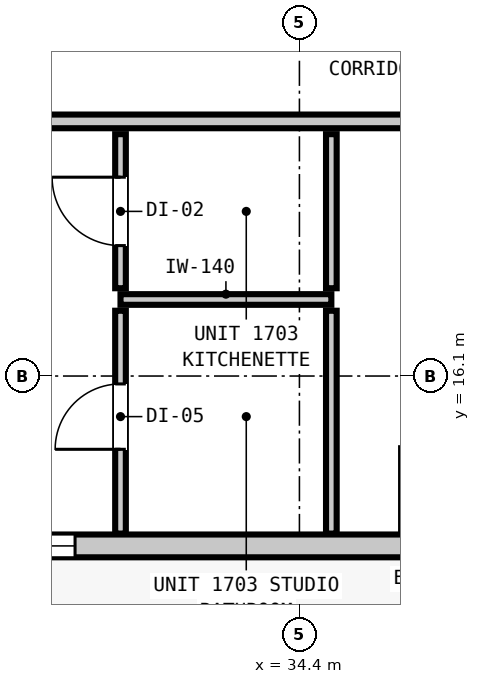
"""IFC4 building model, lengths in metres.
Left out: names, types, materials, properties, quantities, classifications, styles, units other than length and angle.
Written with IfcOpenShell. Run it as: python <this file> out.ifc"""

import sys

from ifc_helpers import new_model, si_unit, direction, frame, frame_2d, origin, place, context, subcontext, project, spatial, rectangle, extrude, element, fill, save


model = new_model("IFC4")
c1 = context("Model", 3, precision=1e-05, world=origin(), true_north=direction((0.0, 1.0)))
c2 = subcontext(c1, "Body", "Model", "MODEL_VIEW")
j1 = project(units=[si_unit("LENGTHUNIT", "METRE"), si_unit("PLANEANGLEUNIT", "RADIAN")], contexts=[c1])
p1 = place(None, origin())
s1 = spatial("IfcSite", under=j1, at=p1, CompositionType="ELEMENT")
p2 = place(p1, origin())
s2 = spatial("IfcBuilding", under=s1, at=p2, CompositionType="ELEMENT")
p3 = place(p2, frame((0.0, 0.0, 61.84)))
s3 = spatial("IfcBuildingStorey", under=s2, at=p3, CompositionType="ELEMENT", Elevation=61.84)
p4 = place(p3, frame((47.835, 13.865, 0.0), z_axis=(0.0, 0.0, 1.0), x_axis=(-1.0, 0.0, 0.0)))
e1 = element("IfcWall", 1, at=p4, inside=s3, PredefinedType="STANDARD", context=c2, shape_type="SweptSolid", body=[
    extrude(rectangle(XDim=37.47, YDim=0.3, at=frame_2d((18.735, 0.0))), origin(), (0.0, 0.0, 1.0), 3.06),
])
p5 = place(p4, frame((1.201, 0.0, 0.0)))
e2 = element("IfcOpeningElement", 2, at=p5, cuts=e1, PredefinedType="OPENING", context=c2, shape_type="SweptSolid", body=[
    extrude(rectangle(XDim=1.1, YDim=2.15, at=frame_2d((0.55, 1.075))), frame((0.0, 0.16, 0.0), z_axis=(0.0, -1.0, 0.0), x_axis=(1.0, 0.0, 0.0)), (0.0, 0.0, 1.0), 0.32),
])
p6 = place(p4, frame((30.75, 0.0, 0.85)))
e3 = element("IfcOpeningElement", 3, at=p6, cuts=e1, PredefinedType="OPENING", context=c2, shape_type="SweptSolid", body=[
    extrude(rectangle(XDim=1.05, YDim=1.65, at=frame_2d((0.525, 0.825))), frame((0.0, 0.16, 0.0), z_axis=(0.0, -1.0, 0.0), x_axis=(1.0, 0.0, 0.0)), (0.0, 0.0, 1.0), 0.32),
])
p7 = place(p4, frame((24.35, 0.0, 0.85)))
e4 = element("IfcOpeningElement", 4, at=p7, cuts=e1, PredefinedType="OPENING", context=c2, shape_type="SweptSolid", body=[
    extrude(rectangle(XDim=1.05, YDim=1.65, at=frame_2d((0.525, 0.825))), frame((0.0, 0.16, 0.0), z_axis=(0.0, -1.0, 0.0), x_axis=(1.0, 0.0, 0.0)), (0.0, 0.0, 1.0), 0.32),
])
p8 = place(p4, frame((16.387, 0.0, 0.85)))
e5 = element("IfcOpeningElement", 5, at=p8, cuts=e1, PredefinedType="OPENING", context=c2, shape_type="SweptSolid", body=[
    extrude(rectangle(XDim=1.05, YDim=1.65, at=frame_2d((0.525, 0.825))), frame((0.0, 0.16, 0.0), z_axis=(0.0, -1.0, 0.0), x_axis=(1.0, 0.0, 0.0)), (0.0, 0.0, 1.0), 0.32),
])
p9 = place(p4, frame((6.043, 0.0, 0.85)))
e6 = element("IfcOpeningElement", 6, at=p9, cuts=e1, PredefinedType="OPENING", context=c2, shape_type="SweptSolid", body=[
    extrude(rectangle(XDim=1.05, YDim=1.65, at=frame_2d((0.525, 0.825))), frame((0.0, 0.16, 0.0), z_axis=(0.0, -1.0, 0.0), x_axis=(1.0, 0.0, 0.0)), (0.0, 0.0, 1.0), 0.32),
])
p10 = place(p3, frame((8.027, 19.45, 0.0), z_axis=(0.0, 0.0, 1.0), x_axis=(1.0, 0.0, 0.0)))
e7 = element("IfcWall", 7, at=p10, inside=s3, PredefinedType="PARTITIONING", context=c2, shape_type="SweptSolid", body=[
    extrude(rectangle(XDim=28.902, YDim=0.18, at=frame_2d((14.451, 0.0))), origin(), (0.0, 0.0, 1.0), 3.06),
])
p11 = place(p10, frame((6.533, 0.0, 0.0)))
e8 = element("IfcOpeningElement", 8, at=p11, cuts=e7, PredefinedType="OPENING", context=c2, shape_type="SweptSolid", body=[
    extrude(rectangle(XDim=1.0, YDim=2.15, at=frame_2d((0.5, 1.075))), frame((0.0, 0.1, 0.0), z_axis=(0.0, -1.0, 0.0), x_axis=(1.0, 0.0, 0.0)), (0.0, 0.0, 1.0), 0.2),
])
p12 = place(p10, frame((13.293, 0.0, 0.0)))
e9 = element("IfcOpeningElement", 9, at=p12, cuts=e7, PredefinedType="OPENING", context=c2, shape_type="SweptSolid", body=[
    extrude(rectangle(XDim=1.0, YDim=2.15, at=frame_2d((0.5, 1.075))), frame((0.0, 0.1, 0.0), z_axis=(0.0, -1.0, 0.0), x_axis=(1.0, 0.0, 0.0)), (0.0, 0.0, 1.0), 0.2),
])
p13 = place(p10, frame((21.256, 0.0, 0.0)))
e10 = element("IfcOpeningElement", 10, at=p13, cuts=e7, PredefinedType="OPENING", context=c2, shape_type="SweptSolid", body=[
    extrude(rectangle(XDim=1.0, YDim=2.15, at=frame_2d((0.5, 1.075))), frame((0.0, 0.1, 0.0), z_axis=(0.0, -1.0, 0.0), x_axis=(1.0, 0.0, 0.0)), (0.0, 0.0, 1.0), 0.2),
])
p14 = place(p3, frame((32.046, 17.107, 0.0), z_axis=(0.0, 0.0, 1.0), x_axis=(1.0, 0.0, 0.0)))
e11 = element("IfcWall", 11, at=p14, inside=s3, PredefinedType="PARTITIONING", context=c2, shape_type="SweptSolid", body=[
    extrude(rectangle(XDim=2.774, YDim=0.14, at=frame_2d((1.387, 0.0))), origin(), (0.0, 0.0, 1.0), 3.06),
])
p15 = place(p3, frame((32.046, 14.027, 0.0), z_axis=(0.0, 0.0, 1.0), x_axis=(0.0, 1.0, 0.0)))
e12 = element("IfcWall", 12, at=p15, inside=s3, PredefinedType="PARTITIONING", context=c2, shape_type="SweptSolid", body=[
    extrude(rectangle(XDim=2.932, YDim=0.14, at=frame_2d((1.466, 0.0))), origin(), (0.0, 0.0, 1.0), 3.06),
])
p16 = place(p15, frame((1.109, 0.0, 0.0)))
e13 = element("IfcOpeningElement", 13, at=p16, cuts=e12, PredefinedType="OPENING", context=c2, shape_type="SweptSolid", body=[
    extrude(rectangle(XDim=0.86, YDim=2.02, at=frame_2d((0.43, 1.01))), frame((0.0, 0.08, 0.0), z_axis=(0.0, -1.0, 0.0), x_axis=(1.0, 0.0, 0.0)), (0.0, 0.0, 1.0), 0.16),
])
p17 = place(p3, frame((32.046, 17.255, 0.0), z_axis=(0.0, 0.0, 1.0), x_axis=(0.0, 1.0, 0.0)))
e14 = element("IfcWall", 14, at=p17, inside=s3, PredefinedType="PARTITIONING", context=c2, shape_type="SweptSolid", body=[
    extrude(rectangle(XDim=2.027, YDim=0.14, at=frame_2d((1.014, 0.0))), origin(), (0.0, 0.0, 1.0), 3.06),
])
p18 = place(p17, frame((0.561, 0.0, 0.0)))
e15 = element("IfcOpeningElement", 15, at=p18, cuts=e14, PredefinedType="OPENING", context=c2, shape_type="SweptSolid", body=[
    extrude(rectangle(XDim=0.9, YDim=2.1, at=frame_2d((0.45, 1.05))), frame((0.0, 0.08, 0.0), z_axis=(0.0, -1.0, 0.0), x_axis=(1.0, 0.0, 0.0)), (0.0, 0.0, 1.0), 0.16),
])
p19 = place(p3, frame((34.82, 14.027, 0.0), z_axis=(0.0, 0.0, 1.0), x_axis=(0.0, 1.0, 0.0)))
e16 = element("IfcWall", 16, at=p19, inside=s3, PredefinedType="PARTITIONING", context=c2, shape_type="SweptSolid", body=[
    extrude(rectangle(XDim=2.932, YDim=0.14, at=frame_2d((1.466, 0.0))), origin(), (0.0, 0.0, 1.0), 3.06),
])
p20 = place(p3, frame((34.82, 17.255, 0.0), z_axis=(0.0, 0.0, 1.0), x_axis=(0.0, 1.0, 0.0)))
e17 = element("IfcWall", 17, at=p20, inside=s3, PredefinedType="PARTITIONING", context=c2, shape_type="SweptSolid", body=[
    extrude(rectangle(XDim=2.027, YDim=0.14, at=frame_2d((1.014, 0.0))), origin(), (0.0, 0.0, 1.0), 3.06),
])
p21 = place(p8, origin())
e18 = element("IfcWindow", 18, at=p21, inside=s3, PartitioningType="SINGLE_PANEL", PredefinedType="WINDOW", context=c2, shape_type="SweptSolid", body=[
    extrude(rectangle(XDim=1.05, YDim=1.65, at=frame_2d((0.525, 0.825))), frame((0.0, 0.03, 0.0), z_axis=(0.0, -1.0, 0.0), x_axis=(1.0, 0.0, 0.0)), (0.0, 0.0, 1.0), 0.06),
])
fill(e5, e18)
p22 = place(p18, origin())
e19 = element("IfcDoor", 19, at=p22, inside=s3, OperationType="SINGLE_SWING_RIGHT", PredefinedType="DOOR", context=c2, shape_type="SweptSolid", body=[
    extrude(rectangle(XDim=0.9, YDim=2.1, at=frame_2d((0.45, 1.05))), frame((0.0, 0.025, 0.0), z_axis=(0.0, -1.0, 0.0), x_axis=(1.0, 0.0, 0.0)), (0.0, 0.0, 1.0), 0.05),
])
fill(e15, e19)
p23 = place(p16, origin())
e20 = element("IfcDoor", 20, at=p23, inside=s3, OperationType="SINGLE_SWING_LEFT", PredefinedType="DOOR", context=c2, shape_type="SweptSolid", body=[
    extrude(rectangle(XDim=0.86, YDim=2.02, at=frame_2d((0.43, 1.01))), frame((0.0, 0.025, 0.0), z_axis=(0.0, -1.0, 0.0), x_axis=(1.0, 0.0, 0.0)), (0.0, 0.0, 1.0), 0.05),
])
fill(e13, e20)
save(model, sys.argv[1])
